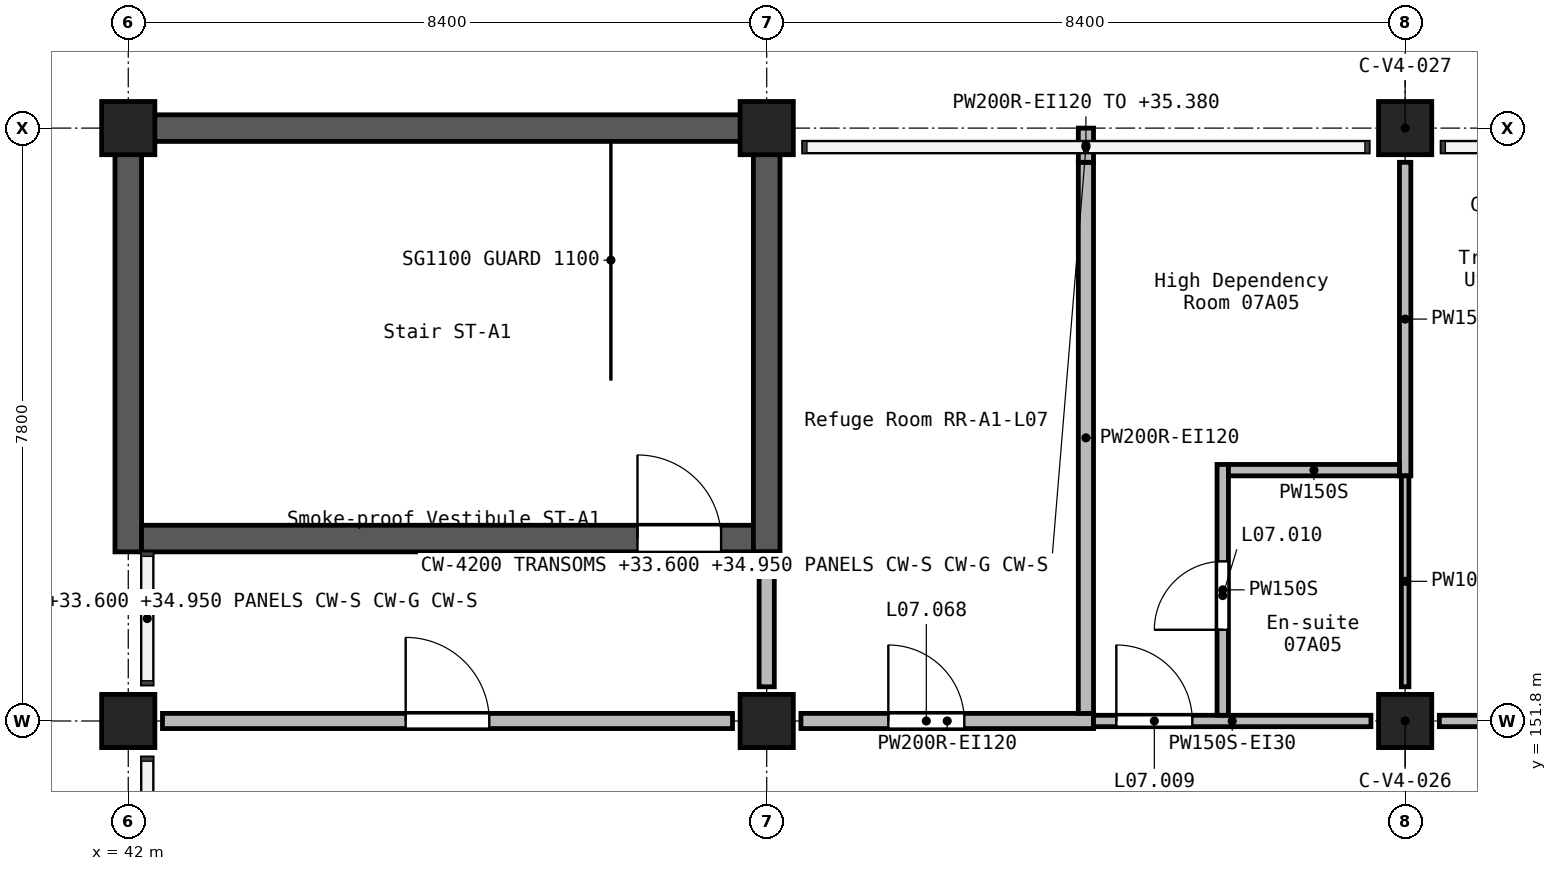
"""IFC4 building model, lengths in metres.
Left out: names, types, materials, properties, quantities, classifications, styles, units other than length and angle.
Written with IfcOpenShell. Run it as: python <this file> out.ifc"""

import sys

from ifc_helpers import new_model, si_unit, direction, frame, frame_2d, origin, origin_2d, place, context, subcontext, project, spatial, rectangle, extrude, element, fill, save


model = new_model("IFC4")
c1 = context("Model", 3, precision=1e-05, world=origin(), true_north=direction((0.0, 1.0)))
c2 = subcontext(c1, "Body", "Model", "MODEL_VIEW")
j1 = project(units=[si_unit("LENGTHUNIT", "METRE"), si_unit("PLANEANGLEUNIT", "RADIAN")], contexts=[c1])
p1 = place(None, origin())
s1 = spatial("IfcSite", under=j1, at=p1, CompositionType="ELEMENT")
p2 = place(p1, origin())
s2 = spatial("IfcBuilding", under=s1, at=p2, CompositionType="ELEMENT")
p3 = place(p2, frame((0.0, 0.0, 32.7)))
s3 = spatial("IfcBuildingStorey", under=s2, at=p3, CompositionType="ELEMENT", Elevation=32.7)
for number, where, z_axis, x_axis in (
    (1, (42.0, 151.8, 0.0), (0.0, 0.0, 1.0), (1.0, 0.0, 0.0)),
    (2, (42.0, 159.6, 0.0), (0.0, 0.0, 1.0), (1.0, 0.0, 0.0)),
    (3, (50.4, 151.8, 0.0), (0.0, 0.0, 1.0), (1.0, 0.0, 0.0)),
    (4, (50.4, 159.6, 0.0), (0.0, 0.0, 1.0), (1.0, 0.0, 0.0)),
    (5, (58.8, 151.8, 0.0), (0.0, 0.0, 1.0), (1.0, 0.0, 0.0)),
    (6, (58.8, 159.6, 0.0), (0.0, 0.0, 1.0), (1.0, 0.0, 0.0)),
):
    element("IfcColumn", number, at=place(p3, frame(where, z_axis=z_axis, x_axis=x_axis)), inside=s3, PredefinedType="COLUMN", context=c2, shape_type="SweptSolid", body=[
        extrude(rectangle(XDim=0.7, YDim=0.7, at=origin_2d()), origin(), (0.0, 0.0, 1.0), 3.9),
    ])
p4 = place(p3, frame((41.825, 159.6, 0.0), z_axis=(0.0, 0.0, 1.0), x_axis=(1.0, 0.0, 0.0)))
e7 = element("IfcWall", 7, at=p4, inside=s3, PredefinedType="SHEAR", context=c2, shape_type="SweptSolid", body=[
    extrude(rectangle(XDim=8.4, YDim=0.35, at=frame_2d((4.2, 0.0))), origin(), (0.0, 0.0, 1.0), 3.9),
])
p5 = place(p3, frame((42.0, 154.025, 0.0), z_axis=(0.0, 0.0, 1.0), x_axis=(0.0, 1.0, 0.0)))
e8 = element("IfcWall", 8, at=p5, inside=s3, PredefinedType="SHEAR", context=c2, shape_type="SweptSolid", body=[
    extrude(rectangle(XDim=5.4, YDim=0.35, at=frame_2d((2.7, 0.0))), origin(), (0.0, 0.0, 1.0), 3.9),
])
p6 = place(p3, frame((42.175, 154.2, 0.0), z_axis=(0.0, 0.0, 1.0), x_axis=(1.0, 0.0, 0.0)))
e9 = element("IfcWall", 9, at=p6, inside=s3, PredefinedType="SHEAR", context=c2, shape_type="SweptSolid", body=[
    extrude(rectangle(XDim=8.05, YDim=0.35, at=frame_2d((4.025, 0.0))), origin(), (0.0, 0.0, 1.0), 3.9),
])
p7 = place(p6, frame((6.525, 0.0, 0.0)))
e10 = element("IfcOpeningElement", 10, at=p7, cuts=e9, PredefinedType="OPENING", context=c2, shape_type="SweptSolid", body=[
    extrude(rectangle(XDim=1.1, YDim=2.1, at=frame_2d((0.55, 1.05))), frame((0.0, 0.185, 0.0), z_axis=(0.0, -1.0, 0.0), x_axis=(1.0, 0.0, 0.0)), (0.0, 0.0, 1.0), 0.37),
])
p8 = place(p3, frame((50.4, 154.025, 0.0), z_axis=(0.0, 0.0, 1.0), x_axis=(0.0, 1.0, 0.0)))
e11 = element("IfcWall", 11, at=p8, inside=s3, PredefinedType="SHEAR", context=c2, shape_type="SweptSolid", body=[
    extrude(rectangle(XDim=5.75, YDim=0.35, at=frame_2d((2.875, 0.0))), origin(), (0.0, 0.0, 1.0), 3.9),
])
p9 = place(p3, frame((42.45, 151.8, 0.0), z_axis=(0.0, 0.0, 1.0), x_axis=(1.0, 0.0, 0.0)))
e12 = element("IfcWall", 12, at=p9, inside=s3, PredefinedType="SOLIDWALL", context=c2, shape_type="SweptSolid", body=[
    extrude(rectangle(XDim=7.5, YDim=0.2, at=frame_2d((3.75, 0.0))), origin(), (0.0, 0.0, 1.0), 3.6),
])
p10 = place(p9, frame((3.2, 0.0, 0.0)))
e13 = element("IfcOpeningElement", 13, at=p10, cuts=e12, PredefinedType="OPENING", context=c2, shape_type="SweptSolid", body=[
    extrude(rectangle(XDim=1.1, YDim=2.1, at=frame_2d((0.55, 1.05))), frame((0.0, 0.11, 0.0), z_axis=(0.0, -1.0, 0.0), x_axis=(1.0, 0.0, 0.0)), (0.0, 0.0, 1.0), 0.22),
])
p11 = place(p3, frame((50.85, 151.8, 0.0), z_axis=(0.0, 0.0, 1.0), x_axis=(1.0, 0.0, 0.0)))
e14 = element("IfcWall", 14, at=p11, inside=s3, PredefinedType="SOLIDWALL", context=c2, shape_type="SweptSolid", body=[
    extrude(rectangle(XDim=3.85, YDim=0.2, at=frame_2d((1.925, 0.0))), origin(), (0.0, 0.0, 1.0), 3.6),
])
p12 = place(p11, frame((1.15, 0.0, 0.0)))
e15 = element("IfcOpeningElement", 15, at=p12, cuts=e14, PredefinedType="OPENING", context=c2, shape_type="SweptSolid", body=[
    extrude(rectangle(XDim=1.0, YDim=2.1, at=frame_2d((0.5, 1.05))), frame((0.0, 0.11, 0.0), z_axis=(0.0, -1.0, 0.0), x_axis=(1.0, 0.0, 0.0)), (0.0, 0.0, 1.0), 0.22),
])
p13 = place(p3, frame((50.4, 152.25, 0.0), z_axis=(0.0, 0.0, 1.0), x_axis=(0.0, 1.0, 0.0)))
e16 = element("IfcWall", 16, at=p13, inside=s3, PredefinedType="SOLIDWALL", context=c2, shape_type="SweptSolid", body=[
    extrude(rectangle(XDim=1.775, YDim=0.2, at=frame_2d((0.887, 0.0))), origin(), (0.0, 0.0, 1.0), 3.6),
])
p14 = place(p3, frame((54.6, 151.9, 0.0), z_axis=(0.0, 0.0, 1.0), x_axis=(0.0, 1.0, 0.0)))
e17 = element("IfcWall", 17, at=p14, inside=s3, PredefinedType="SOLIDWALL", context=c2, shape_type="SweptSolid", body=[
    extrude(rectangle(XDim=7.25, YDim=0.2, at=frame_2d((3.625, 0.0))), origin(), (0.0, 0.0, 1.0), 3.6),
])
p15 = place(p3, frame((54.6, 159.15, 0.0), z_axis=(0.0, 0.0, 1.0), x_axis=(0.0, 1.0, 0.0)))
e18 = element("IfcWall", 18, at=p15, inside=s3, PredefinedType="SOLIDWALL", context=c2, shape_type="SweptSolid", body=[
    extrude(rectangle(XDim=0.45, YDim=0.2, at=frame_2d((0.225, 0.0))), origin(), (0.0, 0.0, 1.0), 2.68),
])
p16 = place(p3, frame((59.25, 151.8, 0.0), z_axis=(0.0, 0.0, 1.0), x_axis=(1.0, 0.0, 0.0)))
e19 = element("IfcWall", 19, at=p16, inside=s3, PredefinedType="PARTITIONING", context=c2, shape_type="SweptSolid", body=[
    extrude(rectangle(XDim=3.675, YDim=0.15, at=frame_2d((1.837, 0.0))), origin(), (0.0, 0.0, 1.0), 3.6),
])
p17 = place(p16, frame((1.15, 0.0, 0.0)))
e20 = element("IfcOpeningElement", 20, at=p17, cuts=e19, PredefinedType="OPENING", context=c2, shape_type="SweptSolid", body=[
    extrude(rectangle(XDim=1.0, YDim=2.1, at=frame_2d((0.5, 1.05))), frame((0.0, 0.085, 0.0), z_axis=(0.0, -1.0, 0.0), x_axis=(1.0, 0.0, 0.0)), (0.0, 0.0, 1.0), 0.17),
])
p18 = place(p3, frame((54.7, 151.8, 0.0), z_axis=(0.0, 0.0, 1.0), x_axis=(1.0, 0.0, 0.0)))
e21 = element("IfcWall", 21, at=p18, inside=s3, PredefinedType="PARTITIONING", context=c2, shape_type="SweptSolid", body=[
    extrude(rectangle(XDim=3.65, YDim=0.15, at=frame_2d((1.825, 0.0))), origin(), (0.0, 0.0, 1.0), 3.6),
])
p19 = place(p18, frame((0.3, 0.0, 0.0)))
e22 = element("IfcOpeningElement", 22, at=p19, cuts=e21, PredefinedType="OPENING", context=c2, shape_type="SweptSolid", body=[
    extrude(rectangle(XDim=1.0, YDim=2.1, at=frame_2d((0.5, 1.05))), frame((0.0, 0.085, 0.0), z_axis=(0.0, -1.0, 0.0), x_axis=(1.0, 0.0, 0.0)), (0.0, 0.0, 1.0), 0.17),
])
p20 = place(p3, frame((58.8, 155.025, 0.0), z_axis=(0.0, 0.0, 1.0), x_axis=(0.0, 1.0, 0.0)))
e23 = element("IfcWall", 23, at=p20, inside=s3, PredefinedType="PARTITIONING", context=c2, shape_type="SweptSolid", body=[
    extrude(rectangle(XDim=4.125, YDim=0.15, at=frame_2d((2.062, 0.0))), origin(), (0.0, 0.0, 1.0), 3.6),
])
p21 = place(p3, frame((56.4, 151.875, 0.0), z_axis=(0.0, 0.0, 1.0), x_axis=(0.0, 1.0, 0.0)))
e24 = element("IfcWall", 24, at=p21, inside=s3, PredefinedType="PARTITIONING", context=c2, shape_type="SweptSolid", body=[
    extrude(rectangle(XDim=3.3, YDim=0.15, at=frame_2d((1.65, 0.0))), origin(), (0.0, 0.0, 1.0), 3.6),
])
p22 = place(p21, frame((1.125, 0.0, 0.0)))
e25 = element("IfcOpeningElement", 25, at=p22, cuts=e24, PredefinedType="OPENING", context=c2, shape_type="SweptSolid", body=[
    extrude(rectangle(XDim=0.9, YDim=2.1, at=frame_2d((0.45, 1.05))), frame((0.0, 0.085, 0.0), z_axis=(0.0, -1.0, 0.0), x_axis=(1.0, 0.0, 0.0)), (0.0, 0.0, 1.0), 0.17),
])
p23 = place(p3, frame((56.475, 155.1, 0.0), z_axis=(0.0, 0.0, 1.0), x_axis=(1.0, 0.0, 0.0)))
e26 = element("IfcWall", 26, at=p23, inside=s3, PredefinedType="PARTITIONING", context=c2, shape_type="SweptSolid", body=[
    extrude(rectangle(XDim=2.25, YDim=0.15, at=frame_2d((1.125, 0.0))), origin(), (0.0, 0.0, 1.0), 3.6),
])
p24 = place(p3, frame((58.8, 152.25, 0.0), z_axis=(0.0, 0.0, 1.0), x_axis=(0.0, 1.0, 0.0)))
e27 = element("IfcWall", 27, at=p24, inside=s3, PredefinedType="PARTITIONING", context=c2, shape_type="SweptSolid", body=[
    extrude(rectangle(XDim=2.775, YDim=0.1, at=frame_2d((1.387, 0.0))), origin(), (0.0, 0.0, 1.0), 3.6),
])
p25 = place(p19, origin())
e28 = element("IfcDoor", 28, at=p25, inside=s3, OperationType="SINGLE_SWING_LEFT", PredefinedType="DOOR", context=c2, shape_type="SweptSolid", body=[
    extrude(rectangle(XDim=1.0, YDim=2.1, at=frame_2d((0.5, 1.05))), frame((0.0, 0.025, 0.0), z_axis=(0.0, -1.0, 0.0), x_axis=(1.0, 0.0, 0.0)), (0.0, 0.0, 1.0), 0.05),
])
fill(e22, e28)
p26 = place(p22, frame((0.9, 0.0, 0.0), z_axis=(0.0, 0.0, 1.0), x_axis=(-1.0, 0.0, 0.0)))
e29 = element("IfcDoor", 29, at=p26, inside=s3, OperationType="SINGLE_SWING_RIGHT", PredefinedType="DOOR", context=c2, shape_type="SweptSolid", body=[
    extrude(rectangle(XDim=0.9, YDim=2.1, at=frame_2d((0.45, 1.05))), frame((0.0, 0.025, 0.0), z_axis=(0.0, -1.0, 0.0), x_axis=(1.0, 0.0, 0.0)), (0.0, 0.0, 1.0), 0.05),
])
fill(e25, e29)
p27 = place(p12, origin())
e30 = element("IfcDoor", 30, at=p27, inside=s3, OperationType="SINGLE_SWING_LEFT", PredefinedType="DOOR", context=c2, shape_type="SweptSolid", body=[
    extrude(rectangle(XDim=1.0, YDim=2.1, at=frame_2d((0.5, 1.05))), frame((0.0, 0.025, 0.0), z_axis=(0.0, -1.0, 0.0), x_axis=(1.0, 0.0, 0.0)), (0.0, 0.0, 1.0), 0.05),
])
fill(e15, e30)
p28 = place(p7, origin())
e31 = element("IfcDoor", 31, at=p28, inside=s3, OperationType="SINGLE_SWING_RIGHT", PredefinedType="DOOR", context=c2, shape_type="SweptSolid", body=[
    extrude(rectangle(XDim=1.1, YDim=2.1, at=frame_2d((0.55, 1.05))), frame((0.0, 0.025, 0.0), z_axis=(0.0, -1.0, 0.0), x_axis=(1.0, 0.0, 0.0)), (0.0, 0.0, 1.0), 0.05),
])
fill(e10, e31)
p29 = place(p10, origin())
e32 = element("IfcDoor", 32, at=p29, inside=s3, OperationType="SINGLE_SWING_RIGHT", PredefinedType="DOOR", context=c2, shape_type="SweptSolid", body=[
    extrude(rectangle(XDim=1.1, YDim=2.1, at=frame_2d((0.55, 1.05))), frame((0.0, 0.025, 0.0), z_axis=(0.0, -1.0, 0.0), x_axis=(1.0, 0.0, 0.0)), (0.0, 0.0, 1.0), 0.05),
])
fill(e13, e32)
save(model, sys.argv[1])
